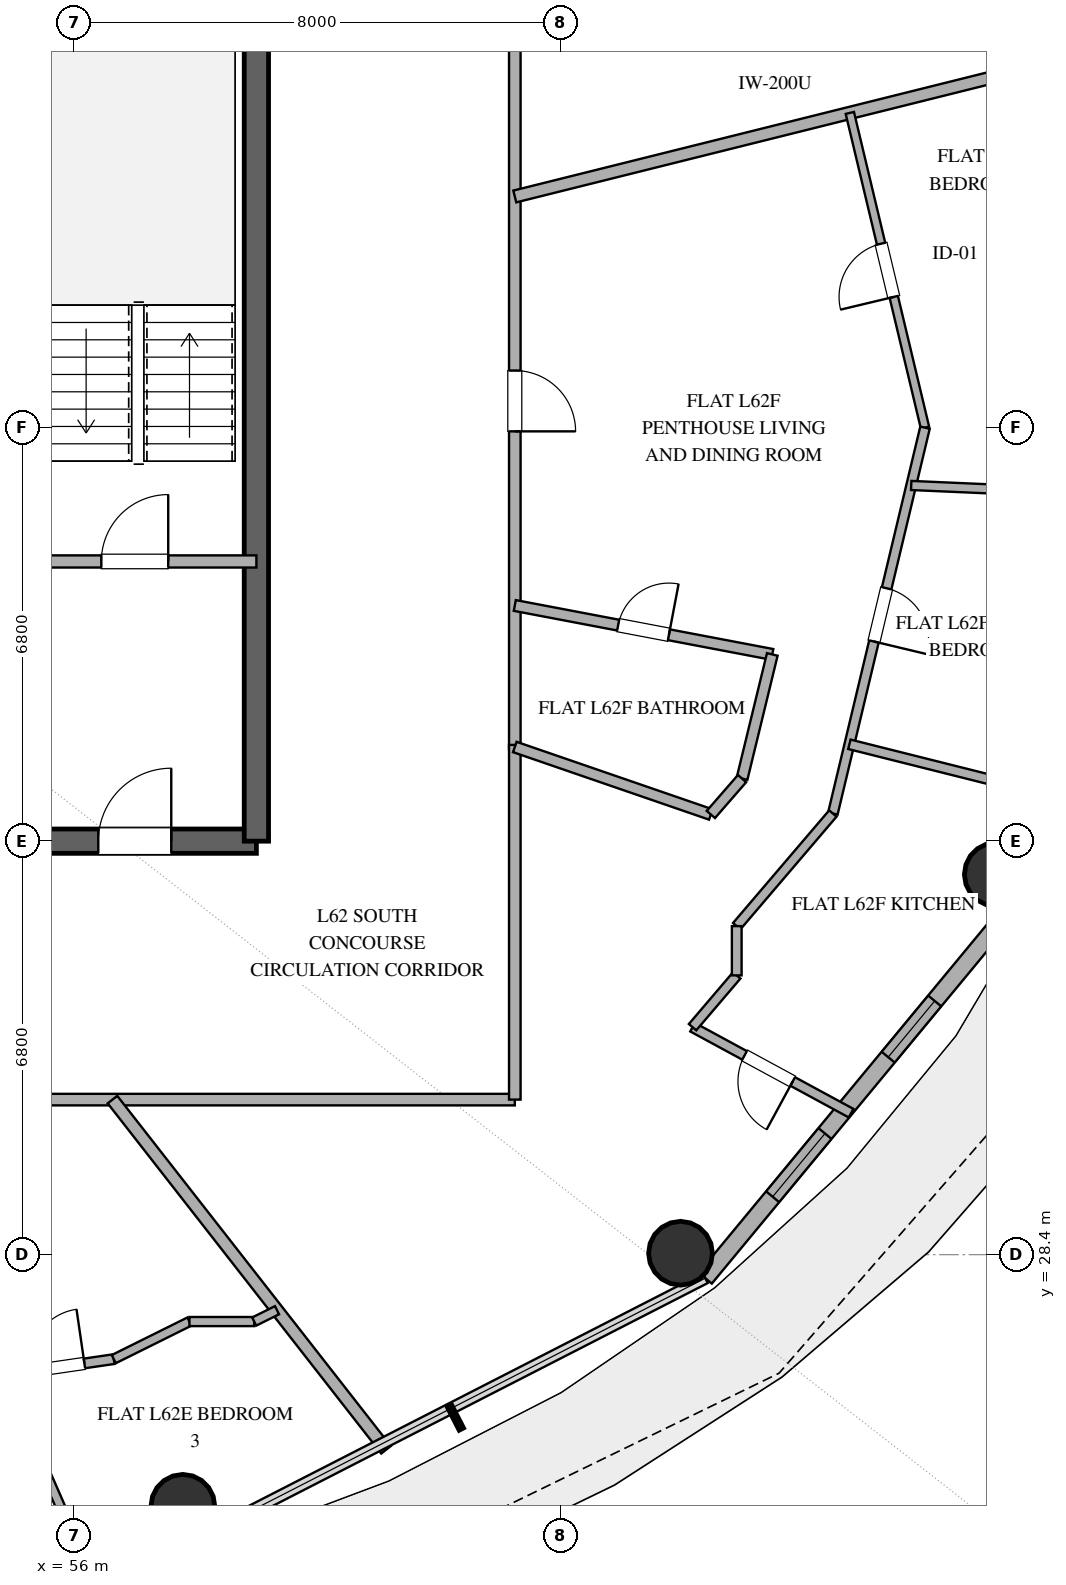
"""IFC4 building model, lengths in metres.
Left out: names, types, materials, properties, quantities, classifications, styles, units other than length and angle.
Written with IfcOpenShell. Run it as: python <this file> out.ifc"""

import sys

from ifc_helpers import new_model, si_unit, direction, frame, frame_2d, origin, origin_2d, place, context, subcontext, project, spatial, rectangle, hollow_circle, extrude, element, fill, save


model = new_model("IFC4")
c1 = context("Model", 3, precision=1e-05, world=origin(), true_north=direction((0.0, 1.0)))
c2 = subcontext(c1, "Body", "Model", "MODEL_VIEW")
j1 = project(units=[si_unit("LENGTHUNIT", "METRE"), si_unit("PLANEANGLEUNIT", "RADIAN")], contexts=[c1])
p1 = place(None, origin())
s1 = spatial("IfcSite", under=j1, at=p1, CompositionType="ELEMENT")
p2 = place(p1, origin())
s2 = spatial("IfcBuilding", under=s1, at=p2, CompositionType="ELEMENT")
p3 = place(p2, frame((0.0, 0.0, 242.4)))
s3 = spatial("IfcBuildingStorey", under=s2, at=p3, CompositionType="ELEMENT", Elevation=242.4)
p4 = place(p3, frame((55.0, 35.2, 0.0), z_axis=(0.0, 0.0, 1.0), x_axis=(1.0, 0.0, 0.0)))
e1 = element("IfcWall", 1, at=p4, inside=s3, PredefinedType="SHEAR", context=c2, shape_type="SweptSolid", body=[
    extrude(rectangle(XDim=4.0, YDim=0.4, at=frame_2d((2.0, 0.0))), origin(), (0.0, 0.0, 1.0), 3.36),
])
p5 = place(p4, frame((1.4, 0.0, 0.0)))
e2 = element("IfcOpeningElement", 2, at=p5, cuts=e1, PredefinedType="OPENING", context=c2, shape_type="SweptSolid", body=[
    extrude(rectangle(XDim=1.2, YDim=2.15, at=frame_2d((0.6, 1.075))), frame((0.0, 0.21, 0.0), z_axis=(0.0, -1.0, 0.0), x_axis=(1.0, 0.0, 0.0)), (0.0, 0.0, 1.0), 0.42),
])
p6 = place(p3, frame((59.0, 35.2, 0.0), z_axis=(0.0, 0.0, 1.0), x_axis=(0.0, 1.0, 0.0)))
e3 = element("IfcWall", 3, at=p6, inside=s3, PredefinedType="SHEAR", context=c2, shape_type="SweptSolid", body=[
    extrude(rectangle(XDim=13.6, YDim=0.4, at=frame_2d((6.8, 0.0))), origin(), (0.0, 0.0, 1.0), 3.36),
])
for number, where, z_axis, x_axis in (
    (4, (57.791, 24.261, 0.0), (0.0, 0.0, 1.0), (1.0, 0.0, 0.0)),
    (5, (65.975, 28.424, 0.0), (0.0, 0.0, 1.0), (1.0, 0.0, 0.0)),
    (6, (71.169, 34.653, 0.0), (0.0, 0.0, 1.0), (1.0, 0.0, 0.0)),
):
    element("IfcColumn", number, at=place(p3, frame(where, z_axis=z_axis, x_axis=x_axis)), inside=s3, PredefinedType="COLUMN", context=c2, shape_type="SweptSolid", body=[
        extrude(hollow_circle(Radius=0.525, WallThickness=0.028, at=origin_2d()), origin(), (0.0, 0.0, 1.0), 3.36),
    ])
p7 = place(p3, frame((66.383, 28.013, 0.0), z_axis=(0.0, 0.0, 1.0), x_axis=(0.63761509934, 0.770355103243, 0.0)))
e7 = element("IfcWall", 7, at=p7, inside=s3, PredefinedType="SOLIDWALL", context=c2, shape_type="SweptSolid", body=[
    extrude(rectangle(XDim=8.33, YDim=0.28, at=frame_2d((4.165, 0.0))), origin(), (0.0, 0.0, 1.0), 3.36),
])
p8 = place(p7, frame((1.738, 0.0, 0.85)))
e8 = element("IfcOpeningElement", 8, at=p8, cuts=e7, PredefinedType="OPENING", context=c2, shape_type="SweptSolid", body=[
    extrude(rectangle(XDim=1.35, YDim=1.8, at=frame_2d((0.675, 0.9))), frame((0.0, 0.15, 0.0), z_axis=(0.0, -1.0, 0.0), x_axis=(1.0, 0.0, 0.0)), (0.0, 0.0, 1.0), 0.3),
])
p9 = place(p7, frame((4.718, 0.0, 0.85)))
e9 = element("IfcOpeningElement", 9, at=p9, cuts=e7, PredefinedType="OPENING", context=c2, shape_type="SweptSolid", body=[
    extrude(rectangle(XDim=1.2, YDim=1.8, at=frame_2d((0.6, 0.9))), frame((0.0, 0.15, 0.0), z_axis=(0.0, -1.0, 0.0), x_axis=(1.0, 0.0, 0.0)), (0.0, 0.0, 1.0), 0.3),
])
p10 = place(p3, frame((55.0, 39.8, 0.0), z_axis=(0.0, 0.0, 1.0), x_axis=(1.0, 0.0, 0.0)))
e10 = element("IfcWall", 10, at=p10, inside=s3, PredefinedType="SOLIDWALL", context=c2, shape_type="SweptSolid", body=[
    extrude(rectangle(XDim=4.0, YDim=0.2, at=frame_2d((2.0, 0.0))), origin(), (0.0, 0.0, 1.0), 2.72),
])
p11 = place(p10, frame((1.45, 0.0, 0.0)))
e11 = element("IfcOpeningElement", 11, at=p11, cuts=e10, PredefinedType="OPENING", context=c2, shape_type="SweptSolid", body=[
    extrude(rectangle(XDim=1.1, YDim=2.15, at=frame_2d((0.55, 1.075))), frame((0.0, 0.11, 0.0), z_axis=(0.0, -1.0, 0.0), x_axis=(1.0, 0.0, 0.0)), (0.0, 0.0, 1.0), 0.22),
])
p12 = place(p3, frame((63.25, 30.95, 0.0), z_axis=(0.0, 0.0, 1.0), x_axis=(-1.0, 0.0, 0.0)))
e12 = element("IfcWall", 12, at=p12, inside=s3, PredefinedType="PARTITIONING", context=c2, shape_type="SweptSolid", body=[
    extrude(rectangle(XDim=19.715, YDim=0.19, at=frame_2d((9.857, 0.0))), origin(), (0.0, 0.0, 1.0), 2.72),
])
p13 = place(p12, frame((11.632, 0.0, 0.0)))
e13 = element("IfcOpeningElement", 13, at=p13, cuts=e12, PredefinedType="OPENING", context=c2, shape_type="SweptSolid", body=[
    extrude(rectangle(XDim=1.0, YDim=2.2, at=frame_2d((0.5, 1.1))), frame((0.0, 0.105, 0.0), z_axis=(0.0, -1.0, 0.0), x_axis=(1.0, 0.0, 0.0)), (0.0, 0.0, 1.0), 0.21),
])
p14 = place(p3, frame((63.25, 53.05, 0.0), z_axis=(0.0, 0.0, 1.0), x_axis=(0.0, -1.0, 0.0)))
e14 = element("IfcWall", 14, at=p14, inside=s3, PredefinedType="PARTITIONING", context=c2, shape_type="SweptSolid", body=[
    extrude(rectangle(XDim=16.335, YDim=0.19, at=frame_2d((8.167, 0.0))), origin(), (0.0, 0.0, 1.0), 2.72),
])
p15 = place(p14, frame((3.14, 0.0, 0.0)))
e15 = element("IfcOpeningElement", 15, at=p15, cuts=e14, PredefinedType="OPENING", context=c2, shape_type="SweptSolid", body=[
    extrude(rectangle(XDim=1.0, YDim=2.2, at=frame_2d((0.5, 1.1))), frame((0.0, 0.105, 0.0), z_axis=(0.0, -1.0, 0.0), x_axis=(1.0, 0.0, 0.0)), (0.0, 0.0, 1.0), 0.21),
])
p16 = place(p14, frame((10.111, 0.0, 0.0)))
e16 = element("IfcOpeningElement", 16, at=p16, cuts=e14, PredefinedType="OPENING", context=c2, shape_type="SweptSolid", body=[
    extrude(rectangle(XDim=1.0, YDim=2.2, at=frame_2d((0.5, 1.1))), frame((0.0, 0.105, 0.0), z_axis=(0.0, -1.0, 0.0), x_axis=(1.0, 0.0, 0.0)), (0.0, 0.0, 1.0), 0.21),
])
p17 = place(p3, frame((63.25, 36.783, 0.0), z_axis=(0.0, 0.0, 1.0), x_axis=(0.0, -1.0, 0.0)))
e17 = element("IfcWall", 17, at=p17, inside=s3, PredefinedType="PARTITIONING", context=c2, shape_type="SweptSolid", body=[
    extrude(rectangle(XDim=5.833, YDim=0.19, at=frame_2d((2.917, 0.0))), origin(), (0.0, 0.0, 1.0), 2.72),
])
p18 = place(p3, frame((63.25, 45.802, 0.0), z_axis=(0.0, 0.0, 1.0), x_axis=(0.970293772743, 0.241929730659, 0.0)))
e18 = element("IfcWall", 18, at=p18, inside=s3, PredefinedType="PARTITIONING", context=c2, shape_type="SweptSolid", body=[
    extrude(rectangle(XDim=9.197, YDim=0.2, at=frame_2d((4.599, 0.0))), origin(), (0.0, 0.0, 1.0), 2.72),
])
p19 = place(p3, frame((69.996, 42.0, 0.0), z_axis=(0.0, 0.0, 1.0), x_axis=(-0.232321322639, 0.972639091877, 0.0)))
e19 = element("IfcWall", 19, at=p19, inside=s3, PredefinedType="PARTITIONING", context=c2, shape_type="SweptSolid", body=[
    extrude(rectangle(XDim=5.322, YDim=0.14, at=frame_2d((2.661, 0.0))), origin(), (0.0, 0.0, 1.0), 2.72),
])
p20 = place(p19, frame((2.211, 0.0, 0.0)))
e20 = element("IfcOpeningElement", 20, at=p20, cuts=e19, PredefinedType="OPENING", context=c2, shape_type="SweptSolid", body=[
    extrude(rectangle(XDim=0.9, YDim=2.1, at=frame_2d((0.45, 1.05))), frame((0.0, 0.08, 0.0), z_axis=(0.0, -1.0, 0.0), x_axis=(1.0, 0.0, 0.0)), (0.0, 0.0, 1.0), 0.16),
])
p21 = place(p3, frame((69.996, 42.0, 0.0), z_axis=(0.0, 0.0, 1.0), x_axis=(-0.232298462197, -0.972644551962, 0.0)))
e21 = element("IfcWall", 21, at=p21, inside=s3, PredefinedType="PLUMBINGWALL", context=c2, shape_type="SweptSolid", body=[
    extrude(rectangle(XDim=6.523, YDim=0.16, at=frame_2d((3.262, 0.0))), origin(), (0.0, 0.0, 1.0), 2.72),
])
p22 = place(p21, frame((2.715, 0.0, 0.0)))
e22 = element("IfcOpeningElement", 22, at=p22, cuts=e21, PredefinedType="OPENING", context=c2, shape_type="SweptSolid", body=[
    extrude(rectangle(XDim=0.9, YDim=2.1, at=frame_2d((0.45, 1.05))), frame((0.0, 0.09, 0.0), z_axis=(0.0, -1.0, 0.0), x_axis=(1.0, 0.0, 0.0)), (0.0, 0.0, 1.0), 0.18),
])
p23 = place(p3, frame((56.633, 30.95, 0.0), z_axis=(0.0, 0.0, 1.0), x_axis=(0.615657656631, -0.788013737083, 0.0)))
e23 = element("IfcWall", 23, at=p23, inside=s3, PredefinedType="PARTITIONING", context=c2, shape_type="SweptSolid", body=[
    extrude(rectangle(XDim=7.308, YDim=0.2, at=frame_2d((3.654, 0.0))), origin(), (0.0, 0.0, 1.0), 2.72),
])
p24 = place(p3, frame((63.25, 39.076, 0.0), z_axis=(0.0, 0.0, 1.0), x_axis=(0.982398995864, -0.186794574134, 0.0)))
e24 = element("IfcWall", 24, at=p24, inside=s3, PredefinedType="PLUMBINGWALL", context=c2, shape_type="SweptSolid", body=[
    extrude(rectangle(XDim=4.311, YDim=0.18, at=frame_2d((2.155, 0.0))), origin(), (0.0, 0.0, 1.0), 2.72),
])
p25 = place(p24, frame((1.73, 0.0, 0.0)))
e25 = element("IfcOpeningElement", 25, at=p25, cuts=e24, PredefinedType="OPENING", context=c2, shape_type="SweptSolid", body=[
    extrude(rectangle(XDim=0.85, YDim=2.1, at=frame_2d((0.425, 1.05))), frame((0.0, 0.1, 0.0), z_axis=(0.0, -1.0, 0.0), x_axis=(1.0, 0.0, 0.0)), (0.0, 0.0, 1.0), 0.2),
])
p26 = place(p3, frame((73.312, 40.895, 0.0), z_axis=(0.0, 0.0, 1.0), x_axis=(-0.999049912793, 0.043580635022, 0.0)))
e26 = element("IfcWall", 26, at=p26, inside=s3, PredefinedType="PARTITIONING", context=c2, shape_type="SweptSolid", body=[
    extrude(rectangle(XDim=3.546, YDim=0.15, at=frame_2d((1.773, 0.0))), origin(), (0.0, 0.0, 1.0), 2.72),
])
p27 = place(p3, frame((72.166, 35.937, 0.0), z_axis=(0.0, 0.0, 1.0), x_axis=(-0.96994628441, 0.24331914302, 0.0)))
e27 = element("IfcWall", 27, at=p27, inside=s3, PredefinedType="PLUMBINGWALL", context=c2, shape_type="SweptSolid", body=[
    extrude(rectangle(XDim=3.519, YDim=0.16, at=frame_2d((1.759, 0.0))), origin(), (0.0, 0.0, 1.0), 2.72),
])
p28 = place(p3, frame((66.474, 35.639, 0.0), z_axis=(0.0, 0.0, 1.0), x_axis=(-0.945522773294, 0.325555963211, 0.0)))
e28 = element("IfcWall", 28, at=p28, inside=s3, PredefinedType="PLUMBINGWALL", context=c2, shape_type="SweptSolid", body=[
    extrude(rectangle(XDim=3.41, YDim=0.18, at=frame_2d((1.705, 0.0))), origin(), (0.0, 0.0, 1.0), 2.72),
])
p29 = place(p3, frame((48.0, 25.42, 0.0), z_axis=(0.0, 0.0, 1.0), x_axis=(0.989540121389, 0.144257922351, 0.0)))
e29 = element("IfcWall", 29, at=p29, inside=s3, PredefinedType="PLUMBINGWALL", context=c2, shape_type="SweptSolid", body=[
    extrude(rectangle(XDim=8.746, YDim=0.16, at=frame_2d((4.373, 0.0))), origin(), (0.0, 0.0, 1.0), 2.72),
])
p30 = place(p29, frame((4.765, 0.0, 0.0)))
e30 = element("IfcOpeningElement", 30, at=p30, cuts=e29, PredefinedType="OPENING", context=c2, shape_type="SweptSolid", body=[
    extrude(rectangle(XDim=0.9, YDim=2.1, at=frame_2d((0.45, 1.05))), frame((0.0, 0.09, 0.0), z_axis=(0.0, -1.0, 0.0), x_axis=(1.0, 0.0, 0.0)), (0.0, 0.0, 1.0), 0.18),
])
p31 = place(p29, frame((1.927, 0.0, 0.0)))
e31 = element("IfcOpeningElement", 31, at=p31, cuts=e29, PredefinedType="OPENING", context=c2, shape_type="SweptSolid", body=[
    extrude(rectangle(XDim=0.9, YDim=2.1, at=frame_2d((0.45, 1.05))), frame((0.0, 0.09, 0.0), z_axis=(0.0, -1.0, 0.0), x_axis=(1.0, 0.0, 0.0)), (0.0, 0.0, 1.0), 0.18),
])
p32 = place(p29, frame((7.358, 0.0, 0.0)))
e32 = element("IfcOpeningElement", 32, at=p32, cuts=e29, PredefinedType="OPENING", context=c2, shape_type="SweptSolid", body=[
    extrude(rectangle(XDim=0.9, YDim=2.1, at=frame_2d((0.45, 1.05))), frame((0.0, 0.09, 0.0), z_axis=(0.0, -1.0, 0.0), x_axis=(1.0, 0.0, 0.0)), (0.0, 0.0, 1.0), 0.18),
])
p33 = place(p3, frame((54.831, 26.416, 0.0), z_axis=(0.0, 0.0, 1.0), x_axis=(0.401469388376, -0.915872442099, 0.0)))
e33 = element("IfcWall", 33, at=p33, inside=s3, PredefinedType="PARTITIONING", context=c2, shape_type="SweptSolid", body=[
    extrude(rectangle(XDim=3.366, YDim=0.15, at=frame_2d((1.683, 0.0))), origin(), (0.0, 0.0, 1.0), 2.72),
])
p34 = place(p3, frame((68.781, 30.727, 0.0), z_axis=(0.0, 0.0, 1.0), x_axis=(-0.878981574643, 0.476855734408, 0.0)))
e34 = element("IfcWall", 34, at=p34, inside=s3, PredefinedType="PLUMBINGWALL", context=c2, shape_type="SweptSolid", body=[
    extrude(rectangle(XDim=2.966, YDim=0.16, at=frame_2d((1.483, 0.0))), origin(), (0.0, 0.0, 1.0), 2.72),
])
p35 = place(p34, frame((1.093, 0.0, 0.0)))
e35 = element("IfcOpeningElement", 35, at=p35, cuts=e34, PredefinedType="OPENING", context=c2, shape_type="SweptSolid", body=[
    extrude(rectangle(XDim=0.9, YDim=2.1, at=frame_2d((0.45, 1.05))), frame((0.0, 0.09, 0.0), z_axis=(0.0, -1.0, 0.0), x_axis=(1.0, 0.0, 0.0)), (0.0, 0.0, 1.0), 0.18),
])
p36 = place(p3, frame((66.9, 33.803, 0.0), z_axis=(0.0, 0.0, 1.0), x_axis=(0.649270866973, 0.760557257082, 0.0)))
e36 = element("IfcWall", 36, at=p36, inside=s3, PredefinedType="PLUMBINGWALL", context=c2, shape_type="SweptSolid", body=[
    extrude(rectangle(XDim=2.435, YDim=0.16, at=frame_2d((1.218, 0.0))), origin(), (0.0, 0.0, 1.0), 2.72),
])
p37 = place(p3, frame((67.485, 38.271, 0.0), z_axis=(0.0, 0.0, 1.0), x_axis=(-0.236517575433, -0.971627210668, 0.0)))
e37 = element("IfcWall", 37, at=p37, inside=s3, PredefinedType="PLUMBINGWALL", context=c2, shape_type="SweptSolid", body=[
    extrude(rectangle(XDim=2.102, YDim=0.18, at=frame_2d((1.051, 0.0))), origin(), (0.0, 0.0, 1.0), 2.72),
])
p38 = place(p3, frame((57.899, 27.3, 0.0), z_axis=(0.0, 0.0, 1.0), x_axis=(-0.895584310315, -0.444891833053, 0.0)))
e38 = element("IfcWall", 38, at=p38, inside=s3, PredefinedType="PARTITIONING", context=c2, shape_type="SweptSolid", body=[
    extrude(rectangle(XDim=1.389, YDim=0.15, at=frame_2d((0.694, 0.0))), origin(), (0.0, 0.0, 1.0), 2.72),
])
p39 = place(p3, frame((66.174, 32.141, 0.0), z_axis=(0.0, 0.0, 1.0), x_axis=(0.648939178463, 0.760840287219, 0.0)))
e39 = element("IfcWall", 39, at=p39, inside=s3, PredefinedType="PLUMBINGWALL", context=c2, shape_type="SweptSolid", body=[
    extrude(rectangle(XDim=1.119, YDim=0.16, at=frame_2d((0.56, 0.0))), origin(), (0.0, 0.0, 1.0), 2.72),
])
p40 = place(p3, frame((58.964, 27.3, 0.0), z_axis=(0.0, 0.0, 1.0), x_axis=(-1.0, 0.0, 0.0)))
e40 = element("IfcWall", 40, at=p40, inside=s3, PredefinedType="PARTITIONING", context=c2, shape_type="SweptSolid", body=[
    extrude(rectangle(XDim=1.065, YDim=0.15, at=frame_2d((0.533, 0.0))), origin(), (0.0, 0.0, 1.0), 2.72),
])
p41 = place(p3, frame((66.9, 32.993, 0.0), z_axis=(0.0, 0.0, 1.0), x_axis=(0.0, 1.0, 0.0)))
e41 = element("IfcWall", 41, at=p41, inside=s3, PredefinedType="PLUMBINGWALL", context=c2, shape_type="SweptSolid", body=[
    extrude(rectangle(XDim=0.81, YDim=0.16, at=frame_2d((0.405, 0.0))), origin(), (0.0, 0.0, 1.0), 2.72),
])
p42 = place(p3, frame((66.988, 36.229, 0.0), z_axis=(0.0, 0.0, 1.0), x_axis=(-0.656402785683, -0.754410619589, 0.0)))
e42 = element("IfcWall", 42, at=p42, inside=s3, PredefinedType="PLUMBINGWALL", context=c2, shape_type="SweptSolid", body=[
    extrude(rectangle(XDim=0.782, YDim=0.18, at=frame_2d((0.391, 0.0))), origin(), (0.0, 0.0, 1.0), 2.72),
])
p43 = place(p3, frame((59.339, 27.487, 0.0), z_axis=(0.0, 0.0, 1.0), x_axis=(-0.895473432012, -0.445114965554, 0.0)))
e43 = element("IfcWall", 43, at=p43, inside=s3, PredefinedType="PARTITIONING", context=c2, shape_type="SweptSolid", body=[
    extrude(rectangle(XDim=0.419, YDim=0.15, at=frame_2d((0.209, 0.0))), origin(), (0.0, 0.0, 1.0), 2.72),
])
p44 = place(p8, origin())
e44 = element("IfcWindow", 44, at=p44, inside=s3, PartitioningType="SINGLE_PANEL", PredefinedType="WINDOW", context=c2, shape_type="SweptSolid", body=[
    extrude(rectangle(XDim=1.35, YDim=1.8, at=frame_2d((0.675, 0.9))), frame((0.0, 0.03, 0.0), z_axis=(0.0, -1.0, 0.0), x_axis=(1.0, 0.0, 0.0)), (0.0, 0.0, 1.0), 0.06),
])
fill(e8, e44)
p45 = place(p9, origin())
e45 = element("IfcWindow", 45, at=p45, inside=s3, PartitioningType="SINGLE_PANEL", PredefinedType="WINDOW", context=c2, shape_type="SweptSolid", body=[
    extrude(rectangle(XDim=1.2, YDim=1.8, at=frame_2d((0.6, 0.9))), frame((0.0, 0.03, 0.0), z_axis=(0.0, -1.0, 0.0), x_axis=(1.0, 0.0, 0.0)), (0.0, 0.0, 1.0), 0.06),
])
fill(e9, e45)
p46 = place(p5, origin())
e46 = element("IfcDoor", 46, at=p46, inside=s3, OperationType="SINGLE_SWING_RIGHT", PredefinedType="DOOR", context=c2, shape_type="SweptSolid", body=[
    extrude(rectangle(XDim=1.2, YDim=2.15, at=frame_2d((0.6, 1.075))), frame((0.0, 0.025, 0.0), z_axis=(0.0, -1.0, 0.0), x_axis=(1.0, 0.0, 0.0)), (0.0, 0.0, 1.0), 0.05),
])
fill(e2, e46)
p47 = place(p11, origin())
e47 = element("IfcDoor", 47, at=p47, inside=s3, OperationType="SINGLE_SWING_RIGHT", PredefinedType="DOOR", context=c2, shape_type="SweptSolid", body=[
    extrude(rectangle(XDim=1.1, YDim=2.15, at=frame_2d((0.55, 1.075))), frame((0.0, 0.025, 0.0), z_axis=(0.0, -1.0, 0.0), x_axis=(1.0, 0.0, 0.0)), (0.0, 0.0, 1.0), 0.05),
])
fill(e11, e47)
p48 = place(p16, origin())
e48 = element("IfcDoor", 48, at=p48, inside=s3, OperationType="SINGLE_SWING_RIGHT", PredefinedType="DOOR", context=c2, shape_type="SweptSolid", body=[
    extrude(rectangle(XDim=1.0, YDim=2.2, at=frame_2d((0.5, 1.1))), frame((0.0, 0.025, 0.0), z_axis=(0.0, -1.0, 0.0), x_axis=(1.0, 0.0, 0.0)), (0.0, 0.0, 1.0), 0.05),
])
fill(e16, e48)
p49 = place(p20, origin())
e49 = element("IfcDoor", 49, at=p49, inside=s3, OperationType="SINGLE_SWING_LEFT", PredefinedType="DOOR", context=c2, shape_type="SweptSolid", body=[
    extrude(rectangle(XDim=0.9, YDim=2.1, at=frame_2d((0.45, 1.05))), frame((0.0, 0.025, 0.0), z_axis=(0.0, -1.0, 0.0), x_axis=(1.0, 0.0, 0.0)), (0.0, 0.0, 1.0), 0.05),
])
fill(e20, e49)
p50 = place(p22, origin())
e50 = element("IfcDoor", 50, at=p50, inside=s3, OperationType="SINGLE_SWING_RIGHT", PredefinedType="DOOR", context=c2, shape_type="SweptSolid", body=[
    extrude(rectangle(XDim=0.9, YDim=2.1, at=frame_2d((0.45, 1.05))), frame((0.0, 0.025, 0.0), z_axis=(0.0, -1.0, 0.0), x_axis=(1.0, 0.0, 0.0)), (0.0, 0.0, 1.0), 0.05),
])
fill(e22, e50)
p51 = place(p25, origin())
e51 = element("IfcDoor", 51, at=p51, inside=s3, OperationType="SINGLE_SWING_RIGHT", PredefinedType="DOOR", context=c2, shape_type="SweptSolid", body=[
    extrude(rectangle(XDim=0.85, YDim=2.1, at=frame_2d((0.425, 1.05))), frame((0.0, 0.025, 0.0), z_axis=(0.0, -1.0, 0.0), x_axis=(1.0, 0.0, 0.0)), (0.0, 0.0, 1.0), 0.05),
])
fill(e25, e51)
p52 = place(p32, origin())
e52 = element("IfcDoor", 52, at=p52, inside=s3, OperationType="SINGLE_SWING_RIGHT", PredefinedType="DOOR", context=c2, shape_type="SweptSolid", body=[
    extrude(rectangle(XDim=0.9, YDim=2.1, at=frame_2d((0.45, 1.05))), frame((0.0, 0.025, 0.0), z_axis=(0.0, -1.0, 0.0), x_axis=(1.0, 0.0, 0.0)), (0.0, 0.0, 1.0), 0.05),
])
fill(e32, e52)
p53 = place(p35, origin())
e53 = element("IfcDoor", 53, at=p53, inside=s3, OperationType="SINGLE_SWING_LEFT", PredefinedType="DOOR", context=c2, shape_type="SweptSolid", body=[
    extrude(rectangle(XDim=0.9, YDim=2.1, at=frame_2d((0.45, 1.05))), frame((0.0, 0.025, 0.0), z_axis=(0.0, -1.0, 0.0), x_axis=(1.0, 0.0, 0.0)), (0.0, 0.0, 1.0), 0.05),
])
fill(e35, e53)
save(model, sys.argv[1])
